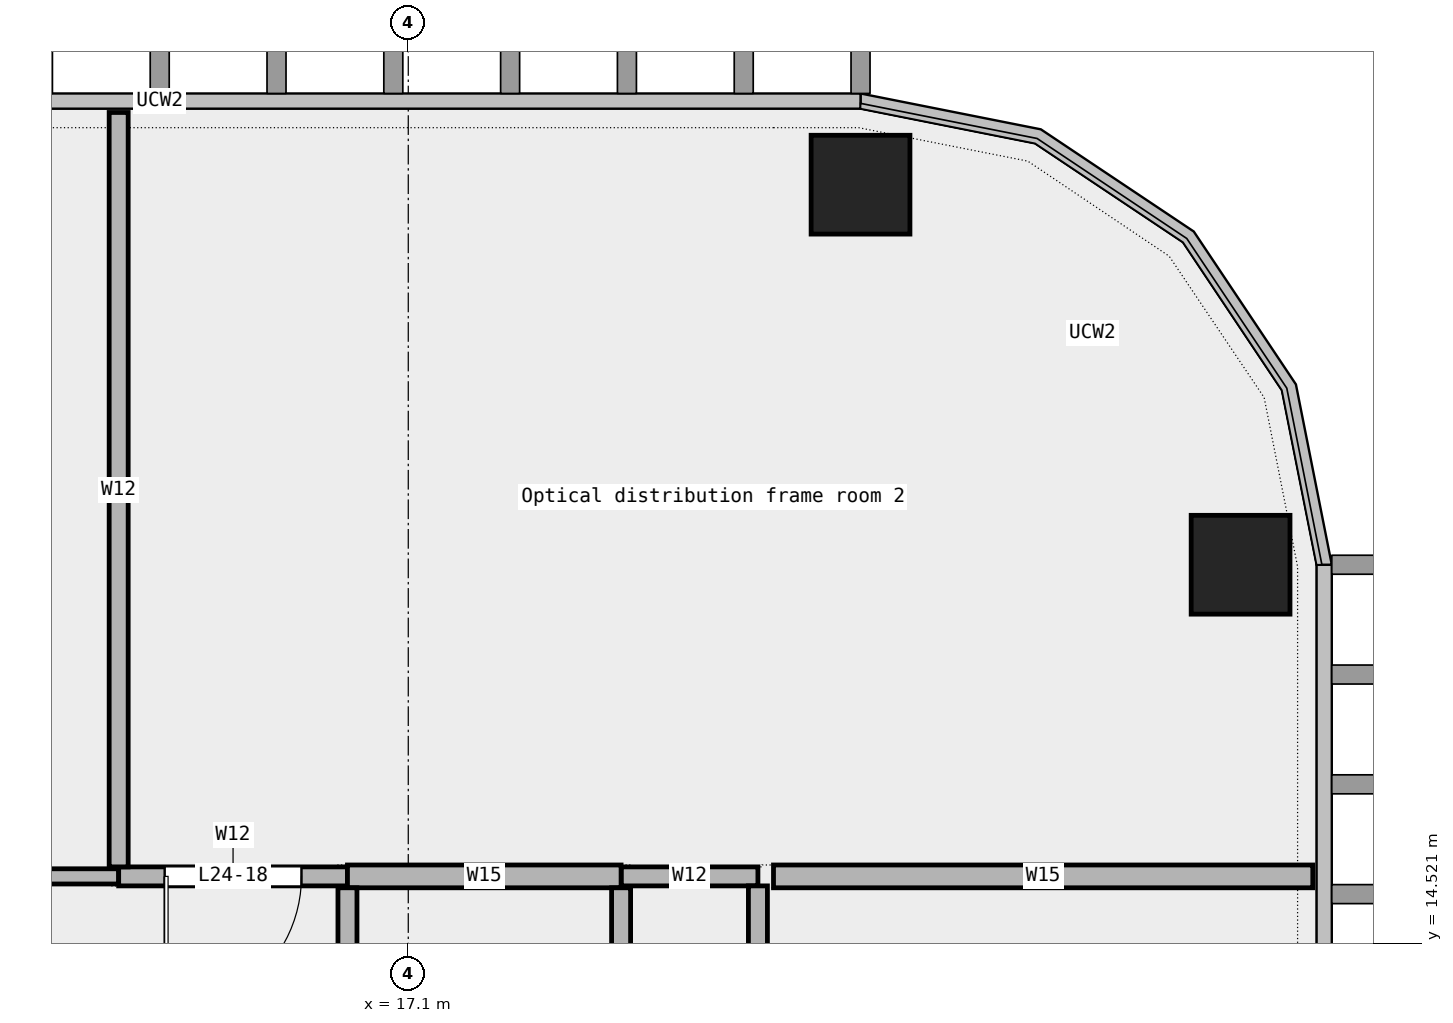
"""IFC4 building model, lengths in metres.
Left out: names, types, materials, properties, quantities, classifications, styles, units other than length and angle.
Written with IfcOpenShell. Run it as: python <this file> out.ifc"""

import sys

from ifc_helpers import new_model, si_unit, direction, frame, frame_2d, origin, origin_2d, place, context, subcontext, project, spatial, rectangle, extrude, element, fill, save


model = new_model("IFC4")
c1 = context("Model", 3, precision=1e-05, world=origin(), true_north=direction((0.0, 1.0)))
c2 = subcontext(c1, "Body", "Model", "MODEL_VIEW")
j1 = project(units=[si_unit("LENGTHUNIT", "METRE"), si_unit("PLANEANGLEUNIT", "RADIAN")], contexts=[c1])
p1 = place(None, origin())
s1 = spatial("IfcSite", under=j1, at=p1, CompositionType="ELEMENT")
p2 = place(p1, origin())
s2 = spatial("IfcBuilding", under=s1, at=p2, CompositionType="ELEMENT")
p3 = place(p2, frame((0.0, 0.0, 121.6)))
s3 = spatial("IfcBuildingStorey", under=s2, at=p3, CompositionType="ELEMENT", Elevation=121.6)
for number, where, z_axis, x_axis in (
    (1, (28.05, 19.5, 0.0), (0.0, 0.0, 1.0), (1.0, 0.0, 0.0)),
    (2, (23.05, 24.5, 0.0), (0.0, 0.0, 1.0), (1.0, 0.0, 0.0)),
):
    element("IfcColumn", number, at=place(p3, frame(where, z_axis=z_axis, x_axis=x_axis)), inside=s3, PredefinedType="COLUMN", context=c2, shape_type="SweptSolid", body=[
        extrude(rectangle(XDim=1.3, YDim=1.3, at=origin_2d()), origin(), (0.0, 0.0, 1.0), 4.05),
    ])
p4 = place(p3, frame((8.86, 15.4, 0.0), z_axis=(0.0, 0.0, 1.0), x_axis=(1.0, 0.0, 0.0)))
e3 = element("IfcWall", 3, at=p4, inside=s3, PredefinedType="PARTITIONING", context=c2, shape_type="SweptSolid", body=[
    extrude(rectangle(XDim=4.43, YDim=0.2, at=frame_2d((2.215, 0.0))), origin(), (0.0, 0.0, 1.0), 4.05),
])
p5 = place(p4, frame((1.765, 0.0, 0.0)))
e4 = element("IfcOpeningElement", 4, at=p5, cuts=e3, PredefinedType="OPENING", context=c2, shape_type="SweptSolid", body=[
    extrude(rectangle(XDim=0.9, YDim=2.1, at=frame_2d((0.45, 1.05))), frame((0.0, 0.112, 0.0), z_axis=(0.0, -1.0, 0.0), x_axis=(1.0, 0.0, 0.0)), (0.0, 0.0, 1.0), 0.224),
])
p6 = place(p3, frame((13.29, 15.4, 0.0), z_axis=(0.0, 0.0, 1.0), x_axis=(1.0, 0.0, 0.0)))
e5 = element("IfcWall", 5, at=p6, inside=s3, PredefinedType="PARTITIONING", context=c2, shape_type="SweptSolid", body=[
    extrude(rectangle(XDim=3.01, YDim=0.25, at=frame_2d((1.505, 0.0))), origin(), (0.0, 0.0, 1.0), 4.05),
])
p7 = place(p6, frame((0.605, 0.0, 0.0)))
e6 = element("IfcOpeningElement", 6, at=p7, cuts=e5, PredefinedType="OPENING", context=c2, shape_type="SweptSolid", body=[
    extrude(rectangle(XDim=1.8, YDim=2.1, at=frame_2d((0.9, 1.05))), frame((0.0, 0.137, 0.0), z_axis=(0.0, -1.0, 0.0), x_axis=(1.0, 0.0, 0.0)), (0.0, 0.0, 1.0), 0.274),
])
p8 = place(p3, frame((19.9, 15.4, 0.0), z_axis=(0.0, 0.0, 1.0), x_axis=(1.0, 0.0, 0.0)))
e7 = element("IfcWall", 7, at=p8, inside=s3, PredefinedType="PARTITIONING", context=c2, shape_type="SweptSolid", body=[
    extrude(rectangle(XDim=1.8, YDim=0.25, at=frame_2d((0.9, 0.0))), origin(), (0.0, 0.0, 1.0), 4.05),
])
p9 = place(p3, frame((16.3, 15.4, 0.0), z_axis=(0.0, 0.0, 1.0), x_axis=(1.0, 0.0, 0.0)))
e8 = element("IfcWall", 8, at=p9, inside=s3, PredefinedType="PARTITIONING", context=c2, shape_type="SweptSolid", body=[
    extrude(rectangle(XDim=3.6, YDim=0.3, at=frame_2d((1.8, 0.0))), origin(), (0.0, 0.0, 1.0), 4.05),
])
p10 = place(p3, frame((21.905, 15.4, 0.0), z_axis=(0.0, 0.0, 1.0), x_axis=(1.0, 0.0, 0.0)))
e9 = element("IfcWall", 9, at=p10, inside=s3, PredefinedType="PARTITIONING", context=c2, shape_type="SweptSolid", body=[
    extrude(rectangle(XDim=7.095, YDim=0.3, at=frame_2d((3.547, 0.0))), origin(), (0.0, 0.0, 1.0), 4.05),
])
p11 = place(p3, frame((13.29, 15.525, 0.0), z_axis=(0.0, 0.0, 1.0), x_axis=(0.0, 1.0, 0.0)))
e10 = element("IfcWall", 10, at=p11, inside=s3, PredefinedType="PARTITIONING", context=c2, shape_type="SweptSolid", body=[
    extrude(rectangle(XDim=9.925, YDim=0.25, at=frame_2d((4.962, 0.0))), origin(), (0.0, 0.0, 1.0), 4.05),
])
p12 = place(p3, frame((16.3, 11.75, 0.0), z_axis=(0.0, 0.0, 1.0), x_axis=(0.0, 1.0, 0.0)))
e11 = element("IfcWall", 11, at=p12, inside=s3, PredefinedType="PARTITIONING", context=c2, shape_type="SweptSolid", body=[
    extrude(rectangle(XDim=3.5, YDim=0.25, at=frame_2d((1.75, 0.0))), origin(), (0.0, 0.0, 1.0), 4.05),
])
p13 = place(p3, frame((19.9, 4.07, 0.0), z_axis=(0.0, 0.0, 1.0), x_axis=(0.0, 1.0, 0.0)))
e12 = element("IfcWall", 12, at=p13, inside=s3, PredefinedType="PARTITIONING", context=c2, shape_type="SweptSolid", body=[
    extrude(rectangle(XDim=11.18, YDim=0.25, at=frame_2d((5.59, 0.0))), origin(), (0.0, 0.0, 1.0), 4.05),
])
p14 = place(p13, frame((2.377, 0.0, 0.0)))
e13 = element("IfcOpeningElement", 13, at=p14, cuts=e12, PredefinedType="OPENING", context=c2, shape_type="SweptSolid", body=[
    extrude(rectangle(XDim=0.9, YDim=2.1, at=frame_2d((0.45, 1.05))), frame((0.0, 0.137, 0.0), z_axis=(0.0, -1.0, 0.0), x_axis=(1.0, 0.0, 0.0)), (0.0, 0.0, 1.0), 0.274),
])
p15 = place(p13, frame((7.968, 0.0, 0.0)))
e14 = element("IfcOpeningElement", 14, at=p15, cuts=e12, PredefinedType="OPENING", context=c2, shape_type="SweptSolid", body=[
    extrude(rectangle(XDim=0.9, YDim=2.1, at=frame_2d((0.45, 1.05))), frame((0.0, 0.137, 0.0), z_axis=(0.0, -1.0, 0.0), x_axis=(1.0, 0.0, 0.0)), (0.0, 0.0, 1.0), 0.274),
])
p16 = place(p3, frame((21.7, 5.025, 0.0), z_axis=(0.0, 0.0, 1.0), x_axis=(0.0, 1.0, 0.0)))
e15 = element("IfcWall", 15, at=p16, inside=s3, PredefinedType="PARTITIONING", context=c2, shape_type="SweptSolid", body=[
    extrude(rectangle(XDim=10.25, YDim=0.25, at=frame_2d((5.125, 0.0))), origin(), (0.0, 0.0, 1.0), 4.05),
])
p17 = place(p16, frame((4.525, 0.0, 0.0)))
e16 = element("IfcOpeningElement", 16, at=p17, cuts=e15, PredefinedType="OPENING", context=c2, shape_type="SweptSolid", body=[
    extrude(rectangle(XDim=1.2, YDim=2.1, at=frame_2d((0.6, 1.05))), frame((0.0, 0.137, 0.0), z_axis=(0.0, -1.0, 0.0), x_axis=(1.0, 0.0, 0.0)), (0.0, 0.0, 1.0), 0.274),
])
p18 = place(p7, origin())
e17 = element("IfcDoor", 17, at=p18, inside=s3, OperationType="DOUBLE_DOOR_SINGLE_SWING", PredefinedType="DOOR", context=c2, shape_type="SweptSolid", body=[
    extrude(rectangle(XDim=1.8, YDim=2.1, at=frame_2d((0.9, 1.05))), frame((0.0, 0.025, 0.0), z_axis=(0.0, -1.0, 0.0), x_axis=(1.0, 0.0, 0.0)), (0.0, 0.0, 1.0), 0.05),
])
fill(e6, e17)
save(model, sys.argv[1])
